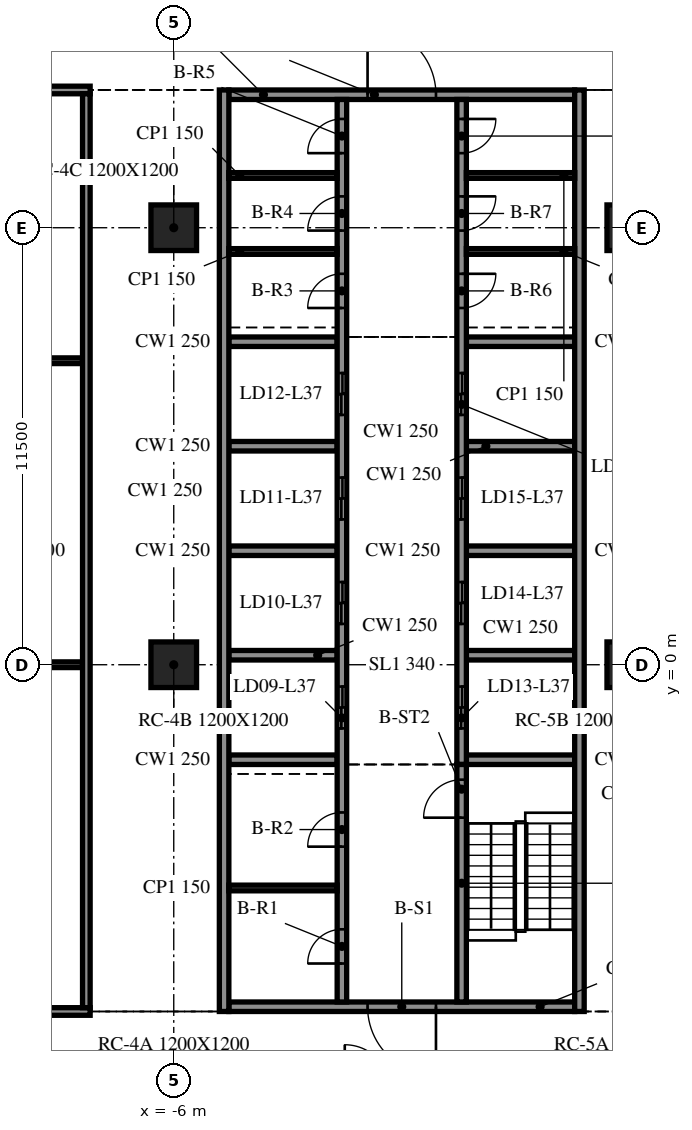
"""IFC4 building model, lengths in metres.
Left out: names, types, materials, properties, quantities, classifications, styles, units other than length and angle.
Written with IfcOpenShell. Run it as: python <this file> out.ifc"""

import sys

from ifc_helpers import new_model, si_unit, direction, frame, frame_2d, origin, origin_2d, place, context, subcontext, project, spatial, rectangle, extrude, element, fill, save


model = new_model("IFC4")
c1 = context("Model", 3, precision=1e-05, world=origin(), true_north=direction((0.0, 1.0)))
c2 = subcontext(c1, "Body", "Model", "MODEL_VIEW")
j1 = project(units=[si_unit("LENGTHUNIT", "METRE"), si_unit("PLANEANGLEUNIT", "RADIAN")], contexts=[c1])
p1 = place(None, origin())
s1 = spatial("IfcSite", under=j1, at=p1, CompositionType="ELEMENT")
p2 = place(p1, origin())
s2 = spatial("IfcBuilding", under=s1, at=p2, CompositionType="ELEMENT")
p3 = place(p2, frame((0.0, 0.0, 159.2)))
s3 = spatial("IfcBuildingStorey", under=s2, at=p3, CompositionType="ELEMENT", Elevation=159.2)
for number, where, z_axis, x_axis in (
    (1, (-6.0, 0.0, -0.34), (0.0, 0.0, 1.0), (1.0, 0.0, 0.0)),
    (2, (-6.0, 11.5, -0.34), (0.0, 0.0, 1.0), (1.0, 0.0, 0.0)),
    (3, (6.0, 0.0, -0.34), (0.0, 0.0, 1.0), (1.0, 0.0, 0.0)),
    (4, (6.0, 11.5, -0.34), (0.0, 0.0, 1.0), (1.0, 0.0, 0.0)),
):
    element("IfcColumn", number, at=place(p3, frame(where, z_axis=z_axis, x_axis=x_axis)), inside=s3, PredefinedType="COLUMN", context=c2, shape_type="SweptSolid", body=[
        extrude(rectangle(XDim=1.2, YDim=1.2, at=origin_2d()), origin(), (0.0, 0.0, 1.0), 3.8),
    ])
for number, where, z_axis, x_axis in (
    (5, (-4.675, 15.125, 0.0), (0.0, 0.0, 1.0), (0.0, -1.0, 0.0)),
    (6, (4.675, -9.125, 0.0), (0.0, 0.0, 1.0), (0.0, 1.0, 0.0)),
):
    element("IfcWall", number, at=place(p3, frame(where, z_axis=z_axis, x_axis=x_axis)), inside=s3, PredefinedType="SOLIDWALL", context=c2, shape_type="SweptSolid", body=[
        extrude(rectangle(XDim=24.25, YDim=0.25, at=frame_2d((12.125, 0.0))), origin(), (0.0, 0.0, 1.0), 3.46),
    ])
p4 = place(p3, frame((4.55, -9.0, 0.0), z_axis=(0.0, 0.0, 1.0), x_axis=(-1.0, 0.0, 0.0)))
e7 = element("IfcWall", 7, at=p4, inside=s3, PredefinedType="SOLIDWALL", context=c2, shape_type="SweptSolid", body=[
    extrude(rectangle(XDim=9.1, YDim=0.25, at=frame_2d((4.55, 0.0))), origin(), (0.0, 0.0, 1.0), 3.46),
])
p5 = place(p4, frame((3.65, 0.0, 0.0)))
e8 = element("IfcOpeningElement", 8, at=p5, cuts=e7, PredefinedType="OPENING", context=c2, shape_type="SweptSolid", body=[
    extrude(rectangle(XDim=1.8, YDim=2.1, at=frame_2d((0.9, 1.05))), frame((0.0, 0.135, 0.0), z_axis=(0.0, -1.0, 0.0), x_axis=(1.0, 0.0, 0.0)), (0.0, 0.0, 1.0), 0.27),
])
p6 = place(p3, frame((-4.55, 15.0, 0.0), z_axis=(0.0, 0.0, 1.0), x_axis=(1.0, 0.0, 0.0)))
e9 = element("IfcWall", 9, at=p6, inside=s3, PredefinedType="SOLIDWALL", context=c2, shape_type="SweptSolid", body=[
    extrude(rectangle(XDim=9.1, YDim=0.25, at=frame_2d((4.55, 0.0))), origin(), (0.0, 0.0, 1.0), 3.46),
])
p7 = place(p6, frame((3.65, 0.0, 0.0)))
e10 = element("IfcOpeningElement", 10, at=p7, cuts=e9, PredefinedType="OPENING", context=c2, shape_type="SweptSolid", body=[
    extrude(rectangle(XDim=1.8, YDim=2.1, at=frame_2d((0.9, 1.05))), frame((0.0, 0.135, 0.0), z_axis=(0.0, -1.0, 0.0), x_axis=(1.0, 0.0, 0.0)), (0.0, 0.0, 1.0), 0.27),
])
p8 = place(p3, frame((-1.575, -8.875, 0.0), z_axis=(0.0, 0.0, 1.0), x_axis=(0.0, 1.0, 0.0)))
e11 = element("IfcWall", 11, at=p8, inside=s3, PredefinedType="SOLIDWALL", context=c2, shape_type="SweptSolid", body=[
    extrude(rectangle(XDim=23.75, YDim=0.25, at=frame_2d((11.875, 0.0))), origin(), (0.0, 0.0, 1.0), 3.46),
])
p9 = place(p8, frame((7.2, 0.0, 0.0)))
e12 = element("IfcOpeningElement", 12, at=p9, cuts=e11, PredefinedType="OPENING", context=c2, shape_type="SweptSolid", body=[
    extrude(rectangle(XDim=1.1, YDim=2.1, at=frame_2d((0.55, 1.05))), frame((0.0, 0.135, 0.0), z_axis=(0.0, -1.0, 0.0), x_axis=(1.0, 0.0, 0.0)), (0.0, 0.0, 1.0), 0.27),
])
p10 = place(p8, frame((9.95, 0.0, 0.0)))
e13 = element("IfcOpeningElement", 13, at=p10, cuts=e11, PredefinedType="OPENING", context=c2, shape_type="SweptSolid", body=[
    extrude(rectangle(XDim=1.1, YDim=2.1, at=frame_2d((0.55, 1.05))), frame((0.0, 0.135, 0.0), z_axis=(0.0, -1.0, 0.0), x_axis=(1.0, 0.0, 0.0)), (0.0, 0.0, 1.0), 0.27),
])
p11 = place(p8, frame((12.7, 0.0, 0.0)))
e14 = element("IfcOpeningElement", 14, at=p11, cuts=e11, PredefinedType="OPENING", context=c2, shape_type="SweptSolid", body=[
    extrude(rectangle(XDim=1.1, YDim=2.1, at=frame_2d((0.55, 1.05))), frame((0.0, 0.135, 0.0), z_axis=(0.0, -1.0, 0.0), x_axis=(1.0, 0.0, 0.0)), (0.0, 0.0, 1.0), 0.27),
])
p12 = place(p8, frame((15.45, 0.0, 0.0)))
e15 = element("IfcOpeningElement", 15, at=p12, cuts=e11, PredefinedType="OPENING", context=c2, shape_type="SweptSolid", body=[
    extrude(rectangle(XDim=1.1, YDim=2.1, at=frame_2d((0.55, 1.05))), frame((0.0, 0.135, 0.0), z_axis=(0.0, -1.0, 0.0), x_axis=(1.0, 0.0, 0.0)), (0.0, 0.0, 1.0), 0.27),
])
p13 = place(p8, frame((1.012, 0.0, 0.0)))
e16 = element("IfcOpeningElement", 16, at=p13, cuts=e11, PredefinedType="OPENING", context=c2, shape_type="SweptSolid", body=[
    extrude(rectangle(XDim=0.9, YDim=2.1, at=frame_2d((0.45, 1.05))), frame((0.0, 0.135, 0.0), z_axis=(0.0, -1.0, 0.0), x_axis=(1.0, 0.0, 0.0)), (0.0, 0.0, 1.0), 0.27),
])
p14 = place(p8, frame((4.087, 0.0, 0.0)))
e17 = element("IfcOpeningElement", 17, at=p14, cuts=e11, PredefinedType="OPENING", context=c2, shape_type="SweptSolid", body=[
    extrude(rectangle(XDim=0.9, YDim=2.1, at=frame_2d((0.45, 1.05))), frame((0.0, 0.135, 0.0), z_axis=(0.0, -1.0, 0.0), x_axis=(1.0, 0.0, 0.0)), (0.0, 0.0, 1.0), 0.27),
])
p15 = place(p8, frame((18.262, 0.0, 0.0)))
e18 = element("IfcOpeningElement", 18, at=p15, cuts=e11, PredefinedType="OPENING", context=c2, shape_type="SweptSolid", body=[
    extrude(rectangle(XDim=0.9, YDim=2.1, at=frame_2d((0.45, 1.05))), frame((0.0, 0.135, 0.0), z_axis=(0.0, -1.0, 0.0), x_axis=(1.0, 0.0, 0.0)), (0.0, 0.0, 1.0), 0.27),
])
p16 = place(p8, frame((20.3, 0.0, 0.0)))
e19 = element("IfcOpeningElement", 19, at=p16, cuts=e11, PredefinedType="OPENING", context=c2, shape_type="SweptSolid", body=[
    extrude(rectangle(XDim=0.9, YDim=2.1, at=frame_2d((0.45, 1.05))), frame((0.0, 0.135, 0.0), z_axis=(0.0, -1.0, 0.0), x_axis=(1.0, 0.0, 0.0)), (0.0, 0.0, 1.0), 0.27),
])
p17 = place(p8, frame((22.337, 0.0, 0.0)))
e20 = element("IfcOpeningElement", 20, at=p17, cuts=e11, PredefinedType="OPENING", context=c2, shape_type="SweptSolid", body=[
    extrude(rectangle(XDim=0.9, YDim=2.1, at=frame_2d((0.45, 1.05))), frame((0.0, 0.135, 0.0), z_axis=(0.0, -1.0, 0.0), x_axis=(1.0, 0.0, 0.0)), (0.0, 0.0, 1.0), 0.27),
])
p18 = place(p3, frame((1.575, -8.875, 0.0), z_axis=(0.0, 0.0, 1.0), x_axis=(0.0, 1.0, 0.0)))
e21 = element("IfcWall", 21, at=p18, inside=s3, PredefinedType="SOLIDWALL", context=c2, shape_type="SweptSolid", body=[
    extrude(rectangle(XDim=6.25, YDim=0.25, at=frame_2d((3.125, 0.0))), origin(), (0.0, 0.0, 1.0), 3.46),
])
p19 = place(p18, frame((4.85, 0.0, 0.0)))
e22 = element("IfcOpeningElement", 22, at=p19, cuts=e21, PredefinedType="OPENING", context=c2, shape_type="SweptSolid", body=[
    extrude(rectangle(XDim=1.0, YDim=2.1, at=frame_2d((0.5, 1.05))), frame((0.0, 0.135, 0.0), z_axis=(0.0, -1.0, 0.0), x_axis=(1.0, 0.0, 0.0)), (0.0, 0.0, 1.0), 0.27),
])
p20 = place(p3, frame((1.575, 14.875, 0.0), z_axis=(0.0, 0.0, 1.0), x_axis=(0.0, -1.0, 0.0)))
e23 = element("IfcWall", 23, at=p20, inside=s3, PredefinedType="SOLIDWALL", context=c2, shape_type="SweptSolid", body=[
    extrude(rectangle(XDim=17.5, YDim=0.25, at=frame_2d((8.75, 0.0))), origin(), (0.0, 0.0, 1.0), 3.46),
])
p21 = place(p20, frame((15.45, 0.0, 0.0)))
e24 = element("IfcOpeningElement", 24, at=p21, cuts=e23, PredefinedType="OPENING", context=c2, shape_type="SweptSolid", body=[
    extrude(rectangle(XDim=1.1, YDim=2.1, at=frame_2d((0.55, 1.05))), frame((0.0, 0.135, 0.0), z_axis=(0.0, -1.0, 0.0), x_axis=(1.0, 0.0, 0.0)), (0.0, 0.0, 1.0), 0.27),
])
p22 = place(p20, frame((12.7, 0.0, 0.0)))
e25 = element("IfcOpeningElement", 25, at=p22, cuts=e23, PredefinedType="OPENING", context=c2, shape_type="SweptSolid", body=[
    extrude(rectangle(XDim=1.1, YDim=2.1, at=frame_2d((0.55, 1.05))), frame((0.0, 0.135, 0.0), z_axis=(0.0, -1.0, 0.0), x_axis=(1.0, 0.0, 0.0)), (0.0, 0.0, 1.0), 0.27),
])
p23 = place(p20, frame((9.95, 0.0, 0.0)))
e26 = element("IfcOpeningElement", 26, at=p23, cuts=e23, PredefinedType="OPENING", context=c2, shape_type="SweptSolid", body=[
    extrude(rectangle(XDim=1.1, YDim=2.1, at=frame_2d((0.55, 1.05))), frame((0.0, 0.135, 0.0), z_axis=(0.0, -1.0, 0.0), x_axis=(1.0, 0.0, 0.0)), (0.0, 0.0, 1.0), 0.27),
])
p24 = place(p20, frame((7.2, 0.0, 0.0)))
e27 = element("IfcOpeningElement", 27, at=p24, cuts=e23, PredefinedType="OPENING", context=c2, shape_type="SweptSolid", body=[
    extrude(rectangle(XDim=1.1, YDim=2.1, at=frame_2d((0.55, 1.05))), frame((0.0, 0.135, 0.0), z_axis=(0.0, -1.0, 0.0), x_axis=(1.0, 0.0, 0.0)), (0.0, 0.0, 1.0), 0.27),
])
p25 = place(p20, frame((4.587, 0.0, 0.0)))
e28 = element("IfcOpeningElement", 28, at=p25, cuts=e23, PredefinedType="OPENING", context=c2, shape_type="SweptSolid", body=[
    extrude(rectangle(XDim=0.9, YDim=2.1, at=frame_2d((0.45, 1.05))), frame((0.0, 0.135, 0.0), z_axis=(0.0, -1.0, 0.0), x_axis=(1.0, 0.0, 0.0)), (0.0, 0.0, 1.0), 0.27),
])
p26 = place(p20, frame((2.55, 0.0, 0.0)))
e29 = element("IfcOpeningElement", 29, at=p26, cuts=e23, PredefinedType="OPENING", context=c2, shape_type="SweptSolid", body=[
    extrude(rectangle(XDim=0.9, YDim=2.1, at=frame_2d((0.45, 1.05))), frame((0.0, 0.135, 0.0), z_axis=(0.0, -1.0, 0.0), x_axis=(1.0, 0.0, 0.0)), (0.0, 0.0, 1.0), 0.27),
])
p27 = place(p20, frame((0.512, 0.0, 0.0)))
e30 = element("IfcOpeningElement", 30, at=p27, cuts=e23, PredefinedType="OPENING", context=c2, shape_type="SweptSolid", body=[
    extrude(rectangle(XDim=0.9, YDim=2.1, at=frame_2d((0.45, 1.05))), frame((0.0, 0.135, 0.0), z_axis=(0.0, -1.0, 0.0), x_axis=(1.0, 0.0, 0.0)), (0.0, 0.0, 1.0), 0.27),
])
for number, where, z_axis, x_axis in (
    (31, (-4.55, -2.5, 0.0), (0.0, 0.0, 1.0), (1.0, 0.0, 0.0)),
    (32, (-4.55, 0.25, 0.0), (0.0, 0.0, 1.0), (1.0, 0.0, 0.0)),
    (33, (-4.55, 3.0, 0.0), (0.0, 0.0, 1.0), (1.0, 0.0, 0.0)),
    (34, (-4.55, 5.75, 0.0), (0.0, 0.0, 1.0), (1.0, 0.0, 0.0)),
    (35, (-4.55, 8.5, 0.0), (0.0, 0.0, 1.0), (1.0, 0.0, 0.0)),
    (36, (1.7, -2.5, 0.0), (0.0, 0.0, 1.0), (1.0, 0.0, 0.0)),
    (37, (1.7, 0.25, 0.0), (0.0, 0.0, 1.0), (1.0, 0.0, 0.0)),
    (38, (1.7, 3.0, 0.0), (0.0, 0.0, 1.0), (1.0, 0.0, 0.0)),
    (39, (1.7, 5.75, 0.0), (0.0, 0.0, 1.0), (1.0, 0.0, 0.0)),
    (40, (1.7, 8.5, 0.0), (0.0, 0.0, 1.0), (1.0, 0.0, 0.0)),
):
    element("IfcWall", number, at=place(p3, frame(where, z_axis=z_axis, x_axis=x_axis)), inside=s3, PredefinedType="SOLIDWALL", context=c2, shape_type="SweptSolid", body=[
        extrude(rectangle(XDim=2.85, YDim=0.25, at=frame_2d((1.425, 0.0))), origin(), (0.0, 0.0, 1.0), 3.46),
    ])
for number, where, z_axis, x_axis in (
    (41, (-4.55, -5.875, 0.0), (0.0, 0.0, 1.0), (1.0, 0.0, 0.0)),
    (42, (-4.55, 10.875, 0.0), (0.0, 0.0, 1.0), (1.0, 0.0, 0.0)),
    (43, (-4.55, 12.875, 0.0), (0.0, 0.0, 1.0), (1.0, 0.0, 0.0)),
    (44, (1.7, 10.875, 0.0), (0.0, 0.0, 1.0), (1.0, 0.0, 0.0)),
    (45, (1.7, 12.875, 0.0), (0.0, 0.0, 1.0), (1.0, 0.0, 0.0)),
):
    element("IfcWall", number, at=place(p3, frame(where, z_axis=z_axis, x_axis=x_axis)), inside=s3, PredefinedType="PARTITIONING", context=c2, shape_type="SweptSolid", body=[
        extrude(rectangle(XDim=2.85, YDim=0.15, at=frame_2d((1.425, 0.0))), origin(), (0.0, 0.0, 1.0), 3.46),
    ])
p28 = place(p3, frame((-15.9, -9.125, 0.0), z_axis=(0.0, 0.0, 1.0), x_axis=(1.0, 0.0, 0.0)))
e46 = element("IfcWall", 46, at=p28, inside=s3, PredefinedType="PARTITIONING", context=c2, shape_type="SweptSolid", body=[
    extrude(rectangle(XDim=7.7, YDim=0.2, at=frame_2d((3.85, 0.0))), origin(), (0.0, 0.0, 1.0), 3.46),
])
p29 = place(p28, frame((3.3, 0.0, 0.0)))
e47 = element("IfcOpeningElement", 47, at=p29, cuts=e46, PredefinedType="OPENING", context=c2, shape_type="SweptSolid", body=[
    extrude(rectangle(XDim=0.9, YDim=2.1, at=frame_2d((0.45, 1.05))), frame((0.0, 0.11, 0.0), z_axis=(0.0, -1.0, 0.0), x_axis=(1.0, 0.0, 0.0)), (0.0, 0.0, 1.0), 0.22),
])
for number, where, z_axis, x_axis in (
    (48, (-15.7, 0.0, 0.0), (0.0, 0.0, 1.0), (1.0, 0.0, 0.0)),
    (49, (-15.7, 8.0, 0.0), (0.0, 0.0, 1.0), (1.0, 0.0, 0.0)),
):
    element("IfcWall", number, at=place(p3, frame(where, z_axis=z_axis, x_axis=x_axis)), inside=s3, PredefinedType="PARTITIONING", context=c2, shape_type="SweptSolid", body=[
        extrude(rectangle(XDim=7.3, YDim=0.15, at=frame_2d((3.65, 0.0))), origin(), (0.0, 0.0, 1.0), 3.46),
    ])
p30 = place(p3, frame((-15.9, 15.125, 0.0), z_axis=(0.0, 0.0, 1.0), x_axis=(1.0, 0.0, 0.0)))
e50 = element("IfcWall", 50, at=p30, inside=s3, PredefinedType="PARTITIONING", context=c2, shape_type="SweptSolid", body=[
    extrude(rectangle(XDim=7.7, YDim=0.2, at=frame_2d((3.85, 0.0))), origin(), (0.0, 0.0, 1.0), 3.46),
])
p31 = place(p30, frame((3.3, 0.0, 0.0)))
e51 = element("IfcOpeningElement", 51, at=p31, cuts=e50, PredefinedType="OPENING", context=c2, shape_type="SweptSolid", body=[
    extrude(rectangle(XDim=1.0, YDim=2.1, at=frame_2d((0.5, 1.05))), frame((0.0, 0.11, 0.0), z_axis=(0.0, -1.0, 0.0), x_axis=(1.0, 0.0, 0.0)), (0.0, 0.0, 1.0), 0.22),
])
p32 = place(p3, frame((-8.3, -9.025, 0.0), z_axis=(0.0, 0.0, 1.0), x_axis=(0.0, 1.0, 0.0)))
e52 = element("IfcWall", 52, at=p32, inside=s3, PredefinedType="PARTITIONING", context=c2, shape_type="SweptSolid", body=[
    extrude(rectangle(XDim=24.05, YDim=0.2, at=frame_2d((12.025, 0.0))), origin(), (0.0, 0.0, 1.0), 3.46),
])
p33 = place(p5, origin())
e53 = element("IfcDoor", 53, at=p33, inside=s3, OperationType="DOUBLE_DOOR_SINGLE_SWING", PredefinedType="DOOR", context=c2, shape_type="SweptSolid", body=[
    extrude(rectangle(XDim=1.8, YDim=2.1, at=frame_2d((0.9, 1.05))), frame((0.0, 0.025, 0.0), z_axis=(0.0, -1.0, 0.0), x_axis=(1.0, 0.0, 0.0)), (0.0, 0.0, 1.0), 0.05),
])
fill(e8, e53)
p34 = place(p7, origin())
e54 = element("IfcDoor", 54, at=p34, inside=s3, OperationType="DOUBLE_DOOR_SINGLE_SWING", PredefinedType="DOOR", context=c2, shape_type="SweptSolid", body=[
    extrude(rectangle(XDim=1.8, YDim=2.1, at=frame_2d((0.9, 1.05))), frame((0.0, 0.025, 0.0), z_axis=(0.0, -1.0, 0.0), x_axis=(1.0, 0.0, 0.0)), (0.0, 0.0, 1.0), 0.05),
])
fill(e10, e54)
p35 = place(p21, origin())
e55 = element("IfcDoor", 55, at=p35, inside=s3, OperationType="DOUBLE_DOOR_SLIDING", PredefinedType="DOOR", context=c2, shape_type="SweptSolid", body=[
    extrude(rectangle(XDim=1.1, YDim=2.1, at=frame_2d((0.55, 1.05))), frame((0.0, 0.025, 0.0), z_axis=(0.0, -1.0, 0.0), x_axis=(1.0, 0.0, 0.0)), (0.0, 0.0, 1.0), 0.05),
])
fill(e24, e55)
p36 = place(p22, origin())
e56 = element("IfcDoor", 56, at=p36, inside=s3, OperationType="DOUBLE_DOOR_SLIDING", PredefinedType="DOOR", context=c2, shape_type="SweptSolid", body=[
    extrude(rectangle(XDim=1.1, YDim=2.1, at=frame_2d((0.55, 1.05))), frame((0.0, 0.025, 0.0), z_axis=(0.0, -1.0, 0.0), x_axis=(1.0, 0.0, 0.0)), (0.0, 0.0, 1.0), 0.05),
])
fill(e25, e56)
p37 = place(p23, origin())
e57 = element("IfcDoor", 57, at=p37, inside=s3, OperationType="DOUBLE_DOOR_SLIDING", PredefinedType="DOOR", context=c2, shape_type="SweptSolid", body=[
    extrude(rectangle(XDim=1.1, YDim=2.1, at=frame_2d((0.55, 1.05))), frame((0.0, 0.025, 0.0), z_axis=(0.0, -1.0, 0.0), x_axis=(1.0, 0.0, 0.0)), (0.0, 0.0, 1.0), 0.05),
])
fill(e26, e57)
p38 = place(p24, origin())
e58 = element("IfcDoor", 58, at=p38, inside=s3, OperationType="DOUBLE_DOOR_SLIDING", PredefinedType="DOOR", context=c2, shape_type="SweptSolid", body=[
    extrude(rectangle(XDim=1.1, YDim=2.1, at=frame_2d((0.55, 1.05))), frame((0.0, 0.025, 0.0), z_axis=(0.0, -1.0, 0.0), x_axis=(1.0, 0.0, 0.0)), (0.0, 0.0, 1.0), 0.05),
])
fill(e27, e58)
p39 = place(p9, origin())
e59 = element("IfcDoor", 59, at=p39, inside=s3, OperationType="DOUBLE_DOOR_SLIDING", PredefinedType="DOOR", context=c2, shape_type="SweptSolid", body=[
    extrude(rectangle(XDim=1.1, YDim=2.1, at=frame_2d((0.55, 1.05))), frame((0.0, 0.025, 0.0), z_axis=(0.0, -1.0, 0.0), x_axis=(1.0, 0.0, 0.0)), (0.0, 0.0, 1.0), 0.05),
])
fill(e12, e59)
p40 = place(p10, origin())
e60 = element("IfcDoor", 60, at=p40, inside=s3, OperationType="DOUBLE_DOOR_SLIDING", PredefinedType="DOOR", context=c2, shape_type="SweptSolid", body=[
    extrude(rectangle(XDim=1.1, YDim=2.1, at=frame_2d((0.55, 1.05))), frame((0.0, 0.025, 0.0), z_axis=(0.0, -1.0, 0.0), x_axis=(1.0, 0.0, 0.0)), (0.0, 0.0, 1.0), 0.05),
])
fill(e13, e60)
p41 = place(p11, origin())
e61 = element("IfcDoor", 61, at=p41, inside=s3, OperationType="DOUBLE_DOOR_SLIDING", PredefinedType="DOOR", context=c2, shape_type="SweptSolid", body=[
    extrude(rectangle(XDim=1.1, YDim=2.1, at=frame_2d((0.55, 1.05))), frame((0.0, 0.025, 0.0), z_axis=(0.0, -1.0, 0.0), x_axis=(1.0, 0.0, 0.0)), (0.0, 0.0, 1.0), 0.05),
])
fill(e14, e61)
p42 = place(p12, origin())
e62 = element("IfcDoor", 62, at=p42, inside=s3, OperationType="DOUBLE_DOOR_SLIDING", PredefinedType="DOOR", context=c2, shape_type="SweptSolid", body=[
    extrude(rectangle(XDim=1.1, YDim=2.1, at=frame_2d((0.55, 1.05))), frame((0.0, 0.025, 0.0), z_axis=(0.0, -1.0, 0.0), x_axis=(1.0, 0.0, 0.0)), (0.0, 0.0, 1.0), 0.05),
])
fill(e15, e62)
p43 = place(p13, origin())
e63 = element("IfcDoor", 63, at=p43, inside=s3, OperationType="SINGLE_SWING_LEFT", PredefinedType="DOOR", context=c2, shape_type="SweptSolid", body=[
    extrude(rectangle(XDim=0.9, YDim=2.1, at=frame_2d((0.45, 1.05))), frame((0.0, 0.025, 0.0), z_axis=(0.0, -1.0, 0.0), x_axis=(1.0, 0.0, 0.0)), (0.0, 0.0, 1.0), 0.05),
])
fill(e16, e63)
p44 = place(p14, origin())
e64 = element("IfcDoor", 64, at=p44, inside=s3, OperationType="SINGLE_SWING_RIGHT", PredefinedType="DOOR", context=c2, shape_type="SweptSolid", body=[
    extrude(rectangle(XDim=0.9, YDim=2.1, at=frame_2d((0.45, 1.05))), frame((0.0, 0.025, 0.0), z_axis=(0.0, -1.0, 0.0), x_axis=(1.0, 0.0, 0.0)), (0.0, 0.0, 1.0), 0.05),
])
fill(e17, e64)
p45 = place(p15, origin())
e65 = element("IfcDoor", 65, at=p45, inside=s3, OperationType="SINGLE_SWING_LEFT", PredefinedType="DOOR", context=c2, shape_type="SweptSolid", body=[
    extrude(rectangle(XDim=0.9, YDim=2.1, at=frame_2d((0.45, 1.05))), frame((0.0, 0.025, 0.0), z_axis=(0.0, -1.0, 0.0), x_axis=(1.0, 0.0, 0.0)), (0.0, 0.0, 1.0), 0.05),
])
fill(e18, e65)
p46 = place(p16, origin())
e66 = element("IfcDoor", 66, at=p46, inside=s3, OperationType="SINGLE_SWING_RIGHT", PredefinedType="DOOR", context=c2, shape_type="SweptSolid", body=[
    extrude(rectangle(XDim=0.9, YDim=2.1, at=frame_2d((0.45, 1.05))), frame((0.0, 0.025, 0.0), z_axis=(0.0, -1.0, 0.0), x_axis=(1.0, 0.0, 0.0)), (0.0, 0.0, 1.0), 0.05),
])
fill(e19, e66)
p47 = place(p17, origin())
e67 = element("IfcDoor", 67, at=p47, inside=s3, OperationType="SINGLE_SWING_LEFT", PredefinedType="DOOR", context=c2, shape_type="SweptSolid", body=[
    extrude(rectangle(XDim=0.9, YDim=2.1, at=frame_2d((0.45, 1.05))), frame((0.0, 0.025, 0.0), z_axis=(0.0, -1.0, 0.0), x_axis=(1.0, 0.0, 0.0)), (0.0, 0.0, 1.0), 0.05),
])
fill(e20, e67)
p48 = place(p25, origin())
e68 = element("IfcDoor", 68, at=p48, inside=s3, OperationType="SINGLE_SWING_RIGHT", PredefinedType="DOOR", context=c2, shape_type="SweptSolid", body=[
    extrude(rectangle(XDim=0.9, YDim=2.1, at=frame_2d((0.45, 1.05))), frame((0.0, 0.025, 0.0), z_axis=(0.0, -1.0, 0.0), x_axis=(1.0, 0.0, 0.0)), (0.0, 0.0, 1.0), 0.05),
])
fill(e28, e68)
p49 = place(p26, origin())
e69 = element("IfcDoor", 69, at=p49, inside=s3, OperationType="SINGLE_SWING_LEFT", PredefinedType="DOOR", context=c2, shape_type="SweptSolid", body=[
    extrude(rectangle(XDim=0.9, YDim=2.1, at=frame_2d((0.45, 1.05))), frame((0.0, 0.025, 0.0), z_axis=(0.0, -1.0, 0.0), x_axis=(1.0, 0.0, 0.0)), (0.0, 0.0, 1.0), 0.05),
])
fill(e29, e69)
p50 = place(p27, origin())
e70 = element("IfcDoor", 70, at=p50, inside=s3, OperationType="SINGLE_SWING_RIGHT", PredefinedType="DOOR", context=c2, shape_type="SweptSolid", body=[
    extrude(rectangle(XDim=0.9, YDim=2.1, at=frame_2d((0.45, 1.05))), frame((0.0, 0.025, 0.0), z_axis=(0.0, -1.0, 0.0), x_axis=(1.0, 0.0, 0.0)), (0.0, 0.0, 1.0), 0.05),
])
fill(e30, e70)
p51 = place(p19, origin())
e71 = element("IfcDoor", 71, at=p51, inside=s3, OperationType="SINGLE_SWING_LEFT", PredefinedType="DOOR", context=c2, shape_type="SweptSolid", body=[
    extrude(rectangle(XDim=1.0, YDim=2.1, at=frame_2d((0.5, 1.05))), frame((0.0, 0.025, 0.0), z_axis=(0.0, -1.0, 0.0), x_axis=(1.0, 0.0, 0.0)), (0.0, 0.0, 1.0), 0.05),
])
fill(e22, e71)
save(model, sys.argv[1])
